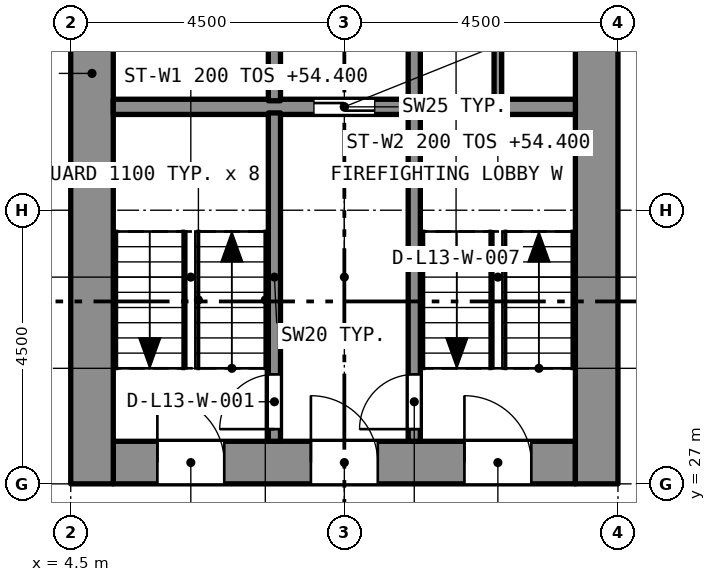
"""IFC4 building model, lengths in metres.
Left out: names, types, materials, properties, quantities, classifications, styles, units other than length and angle.
Written with IfcOpenShell. Run it as: python <this file> out.ifc"""

import sys

from ifc_helpers import new_model, si_unit, direction, frame, frame_2d, origin, place, context, subcontext, project, spatial, rectangle, extrude, element, fill, save


model = new_model("IFC4")
c1 = context("Model", 3, precision=1e-05, world=origin(), true_north=direction((0.0, 1.0)))
c2 = subcontext(c1, "Body", "Model", "MODEL_VIEW")
j1 = project(units=[si_unit("LENGTHUNIT", "METRE"), si_unit("PLANEANGLEUNIT", "RADIAN")], contexts=[c1])
p1 = place(None, origin())
s1 = spatial("IfcSite", under=j1, at=p1, CompositionType="ELEMENT")
p2 = place(p1, origin())
s2 = spatial("IfcBuilding", under=s1, at=p2, CompositionType="ELEMENT")
p3 = place(p2, frame((0.0, 0.0, 52.8)))
s3 = spatial("IfcBuildingStorey", under=s2, at=p3, CompositionType="ELEMENT", Elevation=52.8)
p4 = place(p3, frame((5.2, 27.35, 0.0), z_axis=(0.0, 0.0, 1.0), x_axis=(1.0, 0.0, 0.0)))
e1 = element("IfcWall", 1, at=p4, inside=s3, PredefinedType="SOLIDWALL", context=c2, shape_type="SweptSolid", body=[
    extrude(rectangle(XDim=7.6, YDim=0.7, at=frame_2d((3.8, 0.0))), origin(), (0.0, 0.0, 1.0), 3.2),
])
p5 = place(p4, frame((0.725, 0.0, 0.0)))
e2 = element("IfcOpeningElement", 2, at=p5, cuts=e1, PredefinedType="OPENING", context=c2, shape_type="SweptSolid", body=[
    extrude(rectangle(XDim=1.1, YDim=2.1, at=frame_2d((0.55, 1.05))), frame((0.0, 0.36, 0.0), z_axis=(0.0, -1.0, 0.0), x_axis=(1.0, 0.0, 0.0)), (0.0, 0.0, 1.0), 0.72),
])
p6 = place(p4, frame((3.25, 0.0, 0.0)))
e3 = element("IfcOpeningElement", 3, at=p6, cuts=e1, PredefinedType="OPENING", context=c2, shape_type="SweptSolid", body=[
    extrude(rectangle(XDim=1.1, YDim=2.1, at=frame_2d((0.55, 1.05))), frame((0.0, 0.36, 0.0), z_axis=(0.0, -1.0, 0.0), x_axis=(1.0, 0.0, 0.0)), (0.0, 0.0, 1.0), 0.72),
])
p7 = place(p4, frame((5.775, 0.0, 0.0)))
e4 = element("IfcOpeningElement", 4, at=p7, cuts=e1, PredefinedType="OPENING", context=c2, shape_type="SweptSolid", body=[
    extrude(rectangle(XDim=1.1, YDim=2.1, at=frame_2d((0.55, 1.05))), frame((0.0, 0.36, 0.0), z_axis=(0.0, -1.0, 0.0), x_axis=(1.0, 0.0, 0.0)), (0.0, 0.0, 1.0), 0.72),
])
p8 = place(p3, frame((4.85, 27.0, 0.0), z_axis=(0.0, 0.0, 1.0), x_axis=(0.0, 1.0, 0.0)))
e5 = element("IfcWall", 5, at=p8, inside=s3, PredefinedType="SOLIDWALL", context=c2, shape_type="SweptSolid", body=[
    extrude(rectangle(XDim=13.5, YDim=0.7, at=frame_2d((6.75, 0.0))), origin(), (0.0, 0.0, 1.0), 3.2),
])
p9 = place(p8, frame((8.95, 0.0, 0.0)))
e6 = element("IfcOpeningElement", 6, at=p9, cuts=e5, PredefinedType="OPENING", context=c2, shape_type="SweptSolid", body=[
    extrude(rectangle(XDim=1.2, YDim=2.1, at=frame_2d((0.6, 1.05))), frame((0.0, 0.36, 0.0), z_axis=(0.0, -1.0, 0.0), x_axis=(1.0, 0.0, 0.0)), (0.0, 0.0, 1.0), 0.72),
])
p10 = place(p3, frame((13.15, 27.0, 0.0), z_axis=(0.0, 0.0, 1.0), x_axis=(0.0, 1.0, 0.0)))
e7 = element("IfcWall", 7, at=p10, inside=s3, PredefinedType="SOLIDWALL", context=c2, shape_type="SweptSolid", body=[
    extrude(rectangle(XDim=13.5, YDim=0.7, at=frame_2d((6.75, 0.0))), origin(), (0.0, 0.0, 1.0), 3.2),
])
p11 = place(p10, frame((11.1, 0.0, 0.0)))
e8 = element("IfcOpeningElement", 8, at=p11, cuts=e7, PredefinedType="OPENING", context=c2, shape_type="SweptSolid", body=[
    extrude(rectangle(XDim=1.1, YDim=2.1, at=frame_2d((0.55, 1.05))), frame((0.0, 0.36, 0.0), z_axis=(0.0, -1.0, 0.0), x_axis=(1.0, 0.0, 0.0)), (0.0, 0.0, 1.0), 0.72),
])
p12 = place(p10, frame((8.95, 0.0, 0.0)))
e9 = element("IfcOpeningElement", 9, at=p12, cuts=e7, PredefinedType="OPENING", context=c2, shape_type="SweptSolid", body=[
    extrude(rectangle(XDim=1.2, YDim=2.1, at=frame_2d((0.6, 1.05))), frame((0.0, 0.36, 0.0), z_axis=(0.0, -1.0, 0.0), x_axis=(1.0, 0.0, 0.0)), (0.0, 0.0, 1.0), 0.72),
])
p13 = place(p3, frame((5.2, 33.2, 0.0), z_axis=(0.0, 0.0, 1.0), x_axis=(1.0, 0.0, 0.0)))
e10 = element("IfcWall", 10, at=p13, inside=s3, PredefinedType="SOLIDWALL", context=c2, shape_type="SweptSolid", body=[
    extrude(rectangle(XDim=7.6, YDim=0.25, at=frame_2d((3.8, 0.0))), origin(), (0.0, 0.0, 1.0), 2.9),
])
p14 = place(p13, frame((3.3, 0.0, 0.0)))
e11 = element("IfcOpeningElement", 11, at=p14, cuts=e10, PredefinedType="OPENING", context=c2, shape_type="SweptSolid", body=[
    extrude(rectangle(XDim=1.0, YDim=2.1, at=frame_2d((0.5, 1.05))), frame((0.0, 0.135, 0.0), z_axis=(0.0, -1.0, 0.0), x_axis=(1.0, 0.0, 0.0)), (0.0, 0.0, 1.0), 0.27),
])
p15 = place(p3, frame((7.85, 27.7, 0.0), z_axis=(0.0, 0.0, 1.0), x_axis=(0.0, 1.0, 0.0)))
e12 = element("IfcWall", 12, at=p15, inside=s3, PredefinedType="SOLIDWALL", context=c2, shape_type="SweptSolid", body=[
    extrude(rectangle(XDim=5.4, YDim=0.2, at=frame_2d((2.7, 0.0))), origin(), (0.0, 0.0, 1.0), 2.9),
])
p16 = place(p15, frame((0.2, 0.0, 0.0)))
e13 = element("IfcOpeningElement", 13, at=p16, cuts=e12, PredefinedType="OPENING", context=c2, shape_type="SweptSolid", body=[
    extrude(rectangle(XDim=0.9, YDim=2.1, at=frame_2d((0.45, 1.05))), frame((0.0, 0.11, 0.0), z_axis=(0.0, -1.0, 0.0), x_axis=(1.0, 0.0, 0.0)), (0.0, 0.0, 1.0), 0.22),
])
p17 = place(p3, frame((10.15, 27.7, 0.0), z_axis=(0.0, 0.0, 1.0), x_axis=(0.0, 1.0, 0.0)))
e14 = element("IfcWall", 14, at=p17, inside=s3, PredefinedType="SOLIDWALL", context=c2, shape_type="SweptSolid", body=[
    extrude(rectangle(XDim=5.4, YDim=0.2, at=frame_2d((2.7, 0.0))), origin(), (0.0, 0.0, 1.0), 2.9),
])
p18 = place(p17, frame((0.2, 0.0, 0.0)))
e15 = element("IfcOpeningElement", 15, at=p18, cuts=e14, PredefinedType="OPENING", context=c2, shape_type="SweptSolid", body=[
    extrude(rectangle(XDim=0.9, YDim=2.1, at=frame_2d((0.45, 1.05))), frame((0.0, 0.11, 0.0), z_axis=(0.0, -1.0, 0.0), x_axis=(1.0, 0.0, 0.0)), (0.0, 0.0, 1.0), 0.22),
])
for number, where, z_axis, x_axis in (
    (16, (7.85, 33.3, 0.0), (0.0, 0.0, 1.0), (0.0, 1.0, 0.0)),
    (17, (10.15, 33.3, 0.0), (0.0, 0.0, 1.0), (0.0, 1.0, 0.0)),
):
    element("IfcWall", number, at=place(p3, frame(where, z_axis=z_axis, x_axis=x_axis)), inside=s3, PredefinedType="SOLIDWALL", context=c2, shape_type="SweptSolid", body=[
        extrude(rectangle(XDim=2.3, YDim=0.2, at=frame_2d((1.15, 0.0))), origin(), (0.0, 0.0, 1.0), 2.9),
    ])
p19 = place(p3, frame((11.525, 33.3, 0.0), z_axis=(0.0, 0.0, 1.0), x_axis=(0.0, 1.0, 0.0)))
e18 = element("IfcWall", 18, at=p19, inside=s3, PredefinedType="PARTITIONING", context=c2, shape_type="SweptSolid", body=[
    extrude(rectangle(XDim=2.3, YDim=0.125, at=frame_2d((1.15, 0.0))), origin(), (0.0, 0.0, 1.0), 2.9),
])
p20 = place(p16, origin())
e19 = element("IfcDoor", 19, at=p20, inside=s3, OperationType="SINGLE_SWING_LEFT", PredefinedType="DOOR", context=c2, shape_type="SweptSolid", body=[
    extrude(rectangle(XDim=0.9, YDim=2.1, at=frame_2d((0.45, 1.05))), frame((0.0, 0.025, 0.0), z_axis=(0.0, -1.0, 0.0), x_axis=(1.0, 0.0, 0.0)), (0.0, 0.0, 1.0), 0.05),
])
fill(e13, e19)
p21 = place(p18, origin())
e20 = element("IfcDoor", 20, at=p21, inside=s3, OperationType="SINGLE_SWING_LEFT", PredefinedType="DOOR", context=c2, shape_type="SweptSolid", body=[
    extrude(rectangle(XDim=0.9, YDim=2.1, at=frame_2d((0.45, 1.05))), frame((0.0, 0.025, 0.0), z_axis=(0.0, -1.0, 0.0), x_axis=(1.0, 0.0, 0.0)), (0.0, 0.0, 1.0), 0.05),
])
fill(e15, e20)
p22 = place(p14, origin())
e21 = element("IfcDoor", 21, at=p22, inside=s3, OperationType="SLIDING_TO_LEFT", PredefinedType="DOOR", context=c2, shape_type="SweptSolid", body=[
    extrude(rectangle(XDim=1.0, YDim=2.1, at=frame_2d((0.5, 1.05))), frame((0.0, 0.025, 0.0), z_axis=(0.0, -1.0, 0.0), x_axis=(1.0, 0.0, 0.0)), (0.0, 0.0, 1.0), 0.05),
])
fill(e11, e21)
p23 = place(p5, origin())
e22 = element("IfcDoor", 22, at=p23, inside=s3, OperationType="SINGLE_SWING_LEFT", PredefinedType="DOOR", context=c2, shape_type="SweptSolid", body=[
    extrude(rectangle(XDim=1.1, YDim=2.1, at=frame_2d((0.55, 1.05))), frame((0.0, 0.025, 0.0), z_axis=(0.0, -1.0, 0.0), x_axis=(1.0, 0.0, 0.0)), (0.0, 0.0, 1.0), 0.05),
])
fill(e2, e22)
p24 = place(p6, origin())
e23 = element("IfcDoor", 23, at=p24, inside=s3, OperationType="SINGLE_SWING_LEFT", PredefinedType="DOOR", context=c2, shape_type="SweptSolid", body=[
    extrude(rectangle(XDim=1.1, YDim=2.1, at=frame_2d((0.55, 1.05))), frame((0.0, 0.025, 0.0), z_axis=(0.0, -1.0, 0.0), x_axis=(1.0, 0.0, 0.0)), (0.0, 0.0, 1.0), 0.05),
])
fill(e3, e23)
p25 = place(p7, origin())
e24 = element("IfcDoor", 24, at=p25, inside=s3, OperationType="SINGLE_SWING_LEFT", PredefinedType="DOOR", context=c2, shape_type="SweptSolid", body=[
    extrude(rectangle(XDim=1.1, YDim=2.1, at=frame_2d((0.55, 1.05))), frame((0.0, 0.025, 0.0), z_axis=(0.0, -1.0, 0.0), x_axis=(1.0, 0.0, 0.0)), (0.0, 0.0, 1.0), 0.05),
])
fill(e4, e24)
save(model, sys.argv[1])
